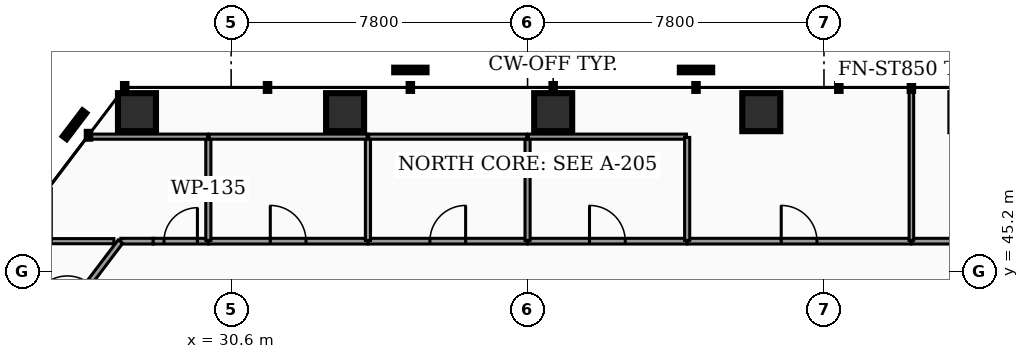
"""IFC4 building model, lengths in metres.
Left out: names, types, materials, properties, quantities, classifications, styles, units other than length and angle.
Written with IfcOpenShell. Run it as: python <this file> out.ifc"""

import sys

from ifc_helpers import new_model, si_unit, direction, frame, frame_2d, origin, origin_2d, place, context, subcontext, project, spatial, rectangle, hollow_rectangle, extrude, element, fill, save


model = new_model("IFC4")
c1 = context("Model", 3, precision=1e-05, world=origin(), true_north=direction((0.0, 1.0)))
c2 = subcontext(c1, "Body", "Model", "MODEL_VIEW")
j1 = project(units=[si_unit("LENGTHUNIT", "METRE"), si_unit("PLANEANGLEUNIT", "RADIAN")], contexts=[c1])
p1 = place(None, origin())
s1 = spatial("IfcSite", under=j1, at=p1, CompositionType="ELEMENT")
p2 = place(p1, origin())
s2 = spatial("IfcBuilding", under=s1, at=p2, CompositionType="ELEMENT")
p3 = place(p2, frame((0.0, 0.0, 47.94)))
s3 = spatial("IfcBuildingStorey", under=s2, at=p3, CompositionType="ELEMENT", Elevation=47.94)
p4 = place(p3, frame((50.026, 49.394, 0.0), z_axis=(0.14189700724, -0.030162599133, 0.989421779096), x_axis=(0.207921314521, 0.978145555103, 0.0)))
e1 = element("IfcColumn", 1, at=p4, inside=s3, PredefinedType="COLUMN", context=c2, shape_type="SweptSolid", body=[
    extrude(hollow_rectangle(XDim=1.0, YDim=1.0, WallThickness=0.05, at=origin_2d()), origin(), (0.0, 0.0, 1.0), 3.861),
])
p5 = place(p3, frame((44.55, 49.394, 0.0), z_axis=(0.068890587168, -0.030398529213, 0.997160978188), x_axis=(0.403702715675, 0.914890221478, 0.0)))
e2 = element("IfcColumn", 2, at=p5, inside=s3, PredefinedType="COLUMN", context=c2, shape_type="SweptSolid", body=[
    extrude(hollow_rectangle(XDim=1.0, YDim=1.0, WallThickness=0.05, at=origin_2d()), origin(), (0.0, 0.0, 1.0), 3.831),
])
p6 = place(p3, frame((39.074, 49.394, 0.0), z_axis=(-0.005238115879, -0.030470503347, 0.999521941014), x_axis=(0.985543500785, -0.169422572462, 0.0)))
e3 = element("IfcColumn", 3, at=p6, inside=s3, PredefinedType="COLUMN", context=c2, shape_type="SweptSolid", body=[
    extrude(hollow_rectangle(XDim=1.0, YDim=1.0, WallThickness=0.05, at=origin_2d()), origin(), (0.0, 0.0, 1.0), 3.822),
])
p7 = place(p3, frame((33.598, 49.394, 0.0), z_axis=(-0.079217404517, -0.030375162343, 0.996394476266), x_axis=(0.358023264849, -0.93371266556, 0.0)))
e4 = element("IfcColumn", 4, at=p7, inside=s3, PredefinedType="COLUMN", context=c2, shape_type="SweptSolid", body=[
    extrude(hollow_rectangle(XDim=1.0, YDim=1.0, WallThickness=0.05, at=origin_2d()), origin(), (0.0, 0.0, 1.0), 3.834),
])
p8 = place(p3, frame((28.122, 49.394, 0.0), z_axis=(-0.151973974665, -0.030116986255, 0.987925542824), x_axis=(0.194391667853, -0.980923992708, 0.0)))
e5 = element("IfcColumn", 5, at=p8, inside=s3, PredefinedType="COLUMN", context=c2, shape_type="SweptSolid", body=[
    extrude(hollow_rectangle(XDim=1.0, YDim=1.0, WallThickness=0.05, at=origin_2d()), origin(), (0.0, 0.0, 1.0), 3.867),
])
p9 = place(p3, frame((27.696, 46.0, 0.0), z_axis=(0.0, 0.0, 1.0), x_axis=(1.0, 0.0, 0.0)))
e6 = element("IfcWall", 6, at=p9, inside=s3, PredefinedType="PARTITIONING", context=c2, shape_type="SweptSolid", body=[
    extrude(rectangle(XDim=0.854, YDim=0.15, at=frame_2d((0.427, 0.0))), origin(), (0.0, 0.0, 1.0), 2.777),
])
p10 = place(p3, frame((28.55, 46.0, 0.0), z_axis=(0.0, 0.0, 1.0), x_axis=(1.0, 0.0, 0.0)))
e7 = element("IfcWall", 7, at=p10, inside=s3, PredefinedType="PARTITIONING", context=c2, shape_type="SweptSolid", body=[
    extrude(rectangle(XDim=1.445, YDim=0.15, at=frame_2d((0.723, 0.0))), origin(), (0.0, 0.0, 1.0), 2.777),
])
p11 = place(p10, frame((0.282, 0.0, 0.0)))
e8 = element("IfcOpeningElement", 8, at=p11, cuts=e7, PredefinedType="OPENING", context=c2, shape_type="SweptSolid", body=[
    extrude(rectangle(XDim=0.88, YDim=2.05, at=frame_2d((0.44, 1.025))), frame((0.0, 0.085, 0.0), z_axis=(0.0, -1.0, 0.0), x_axis=(1.0, 0.0, 0.0)), (0.0, 0.0, 1.0), 0.17),
])
p12 = place(p3, frame((30.005, 46.0, 0.0), z_axis=(0.0, 0.0, 1.0), x_axis=(1.0, 0.0, 0.0)))
e9 = element("IfcWall", 9, at=p12, inside=s3, PredefinedType="PARTITIONING", context=c2, shape_type="SweptSolid", body=[
    extrude(rectangle(XDim=4.19, YDim=0.15, at=frame_2d((2.095, 0.0))), origin(), (0.0, 0.0, 1.0), 2.777),
])
p13 = place(p12, frame((1.625, 0.0, 0.0)))
e10 = element("IfcOpeningElement", 10, at=p13, cuts=e9, PredefinedType="OPENING", context=c2, shape_type="SweptSolid", body=[
    extrude(rectangle(XDim=0.94, YDim=2.05, at=frame_2d((0.47, 1.025))), frame((0.0, 0.085, 0.0), z_axis=(0.0, -1.0, 0.0), x_axis=(1.0, 0.0, 0.0)), (0.0, 0.0, 1.0), 0.17),
])
p14 = place(p3, frame((34.205, 46.0, 0.0), z_axis=(0.0, 0.0, 1.0), x_axis=(1.0, 0.0, 0.0)))
e11 = element("IfcWall", 11, at=p14, inside=s3, PredefinedType="PARTITIONING", context=c2, shape_type="SweptSolid", body=[
    extrude(rectangle(XDim=4.19, YDim=0.15, at=frame_2d((2.095, 0.0))), origin(), (0.0, 0.0, 1.0), 2.777),
])
p15 = place(p14, frame((1.625, 0.0, 0.0)))
e12 = element("IfcOpeningElement", 12, at=p15, cuts=e11, PredefinedType="OPENING", context=c2, shape_type="SweptSolid", body=[
    extrude(rectangle(XDim=0.94, YDim=2.05, at=frame_2d((0.47, 1.025))), frame((0.0, 0.085, 0.0), z_axis=(0.0, -1.0, 0.0), x_axis=(1.0, 0.0, 0.0)), (0.0, 0.0, 1.0), 0.17),
])
p16 = place(p3, frame((38.405, 46.0, 0.0), z_axis=(0.0, 0.0, 1.0), x_axis=(1.0, 0.0, 0.0)))
e13 = element("IfcWall", 13, at=p16, inside=s3, PredefinedType="PARTITIONING", context=c2, shape_type="SweptSolid", body=[
    extrude(rectangle(XDim=4.19, YDim=0.15, at=frame_2d((2.095, 0.0))), origin(), (0.0, 0.0, 1.0), 2.777),
])
p17 = place(p16, frame((1.625, 0.0, 0.0)))
e14 = element("IfcOpeningElement", 14, at=p17, cuts=e13, PredefinedType="OPENING", context=c2, shape_type="SweptSolid", body=[
    extrude(rectangle(XDim=0.94, YDim=2.05, at=frame_2d((0.47, 1.025))), frame((0.0, 0.085, 0.0), z_axis=(0.0, -1.0, 0.0), x_axis=(1.0, 0.0, 0.0)), (0.0, 0.0, 1.0), 0.17),
])
p18 = place(p3, frame((25.462, 43.051, 0.0), z_axis=(0.0, 0.0, 1.0), x_axis=(0.603862791153, 0.7970882821, 0.0)))
e15 = element("IfcWall", 15, at=p18, inside=s3, PredefinedType="PARTITIONING", context=c2, shape_type="SweptSolid", body=[
    extrude(rectangle(XDim=3.684, YDim=0.15, at=frame_2d((1.842, 0.0))), origin(), (0.0, 0.0, 1.0), 2.777),
])
p19 = place(p18, frame((1.372, 0.0, 0.0)))
e16 = element("IfcOpeningElement", 16, at=p19, cuts=e15, PredefinedType="OPENING", context=c2, shape_type="SweptSolid", body=[
    extrude(rectangle(XDim=0.94, YDim=2.05, at=frame_2d((0.47, 1.025))), frame((0.0, 0.085, 0.0), z_axis=(0.0, -1.0, 0.0), x_axis=(1.0, 0.0, 0.0)), (0.0, 0.0, 1.0), 0.17),
])
p20 = place(p3, frame((48.505, 46.0, 0.0), z_axis=(0.0, 0.0, 1.0), x_axis=(1.0, 0.0, 0.0)))
e17 = element("IfcWall", 17, at=p20, inside=s3, PredefinedType="PARTITIONING", context=c2, shape_type="SweptSolid", body=[
    extrude(rectangle(XDim=1.925, YDim=0.15, at=frame_2d((0.962, 0.0))), origin(), (0.0, 0.0, 1.0), 2.777),
])
p21 = place(p3, frame((42.605, 46.0, 0.0), z_axis=(0.0, 0.0, 1.0), x_axis=(1.0, 0.0, 0.0)))
e18 = element("IfcWall", 18, at=p21, inside=s3, PredefinedType="PARTITIONING", context=c2, shape_type="SweptSolid", body=[
    extrude(rectangle(XDim=5.88, YDim=0.15, at=frame_2d((2.94, 0.0))), origin(), (0.0, 0.0, 1.0), 2.777),
])
p22 = place(p21, frame((2.47, 0.0, 0.0)))
e19 = element("IfcOpeningElement", 19, at=p22, cuts=e18, PredefinedType="OPENING", context=c2, shape_type="SweptSolid", body=[
    extrude(rectangle(XDim=0.94, YDim=2.05, at=frame_2d((0.47, 1.025))), frame((0.0, 0.085, 0.0), z_axis=(0.0, -1.0, 0.0), x_axis=(1.0, 0.0, 0.0)), (0.0, 0.0, 1.0), 0.17),
])
p23 = place(p3, frame((30.0, 46.02, 0.0), z_axis=(0.0, 0.0, 1.0), x_axis=(0.0, 1.0, 0.0)))
e20 = element("IfcWall", 20, at=p23, inside=s3, PredefinedType="PARTITIONING", context=c2, shape_type="SweptSolid", body=[
    extrude(rectangle(XDim=2.71, YDim=0.135, at=frame_2d((1.355, 0.0))), origin(), (0.0, 0.0, 1.0), 2.777),
])
p24 = place(p3, frame((25.82, 46.0, 0.0), z_axis=(0.0, 0.0, 1.0), x_axis=(1.0, 0.0, 0.0)))
e21 = element("IfcWall", 21, at=p24, inside=s3, PredefinedType="PARTITIONING", context=c2, shape_type="SweptSolid", body=[
    extrude(rectangle(XDim=1.695, YDim=0.135, at=frame_2d((0.847, 0.0))), origin(), (0.0, 0.0, 1.0), 2.777),
])
p25 = place(p3, frame((26.833, 48.75, 0.0), z_axis=(0.0, 0.0, 1.0), x_axis=(1.0, 0.0, 0.0)))
e22 = element("IfcWall", 22, at=p25, inside=s3, PredefinedType="PARTITIONING", context=c2, shape_type="SweptSolid", body=[
    extrude(rectangle(XDim=3.146, YDim=0.135, at=frame_2d((1.573, 0.0))), origin(), (0.0, 0.0, 1.0), 2.777),
])
p26 = place(p3, frame((34.2, 46.02, 0.0), z_axis=(0.0, 0.0, 1.0), x_axis=(0.0, 1.0, 0.0)))
e23 = element("IfcWall", 23, at=p26, inside=s3, PredefinedType="PARTITIONING", context=c2, shape_type="SweptSolid", body=[
    extrude(rectangle(XDim=2.71, YDim=0.135, at=frame_2d((1.355, 0.0))), origin(), (0.0, 0.0, 1.0), 2.777),
])
p27 = place(p3, frame((30.02, 48.75, 0.0), z_axis=(0.0, 0.0, 1.0), x_axis=(1.0, 0.0, 0.0)))
e24 = element("IfcWall", 24, at=p27, inside=s3, PredefinedType="PARTITIONING", context=c2, shape_type="SweptSolid", body=[
    extrude(rectangle(XDim=4.16, YDim=0.135, at=frame_2d((2.08, 0.0))), origin(), (0.0, 0.0, 1.0), 2.777),
])
p28 = place(p3, frame((38.4, 46.02, 0.0), z_axis=(0.0, 0.0, 1.0), x_axis=(0.0, 1.0, 0.0)))
e25 = element("IfcWall", 25, at=p28, inside=s3, PredefinedType="PARTITIONING", context=c2, shape_type="SweptSolid", body=[
    extrude(rectangle(XDim=2.71, YDim=0.135, at=frame_2d((1.355, 0.0))), origin(), (0.0, 0.0, 1.0), 2.777),
])
p29 = place(p3, frame((34.22, 48.75, 0.0), z_axis=(0.0, 0.0, 1.0), x_axis=(1.0, 0.0, 0.0)))
e26 = element("IfcWall", 26, at=p29, inside=s3, PredefinedType="PARTITIONING", context=c2, shape_type="SweptSolid", body=[
    extrude(rectangle(XDim=4.16, YDim=0.135, at=frame_2d((2.08, 0.0))), origin(), (0.0, 0.0, 1.0), 2.777),
])
p30 = place(p3, frame((38.42, 48.75, 0.0), z_axis=(0.0, 0.0, 1.0), x_axis=(1.0, 0.0, 0.0)))
e27 = element("IfcWall", 27, at=p30, inside=s3, PredefinedType="PARTITIONING", context=c2, shape_type="SweptSolid", body=[
    extrude(rectangle(XDim=4.16, YDim=0.135, at=frame_2d((2.08, 0.0))), origin(), (0.0, 0.0, 1.0), 2.777),
])
p31 = place(p3, frame((42.6, 46.02, 0.0), z_axis=(0.0, 0.0, 1.0), x_axis=(0.0, 1.0, 0.0)))
e28 = element("IfcWall", 28, at=p31, inside=s3, PredefinedType="PARTITIONING", context=c2, shape_type="SweptSolid", body=[
    extrude(rectangle(XDim=2.71, YDim=0.135, at=frame_2d((1.355, 0.0))), origin(), (0.0, 0.0, 1.0), 2.777),
])
p32 = place(p3, frame((48.5, 46.02, 0.0), z_axis=(0.0, 0.0, 1.0), x_axis=(0.0, 1.0, 0.0)))
e29 = element("IfcWall", 29, at=p32, inside=s3, PredefinedType="PARTITIONING", context=c2, shape_type="SweptSolid", body=[
    extrude(rectangle(XDim=4.009, YDim=0.12, at=frame_2d((2.005, 0.0))), origin(), (0.0, 0.0, 1.0), 2.777),
])
p33 = place(p11, origin())
e30 = element("IfcDoor", 30, at=p33, inside=s3, OperationType="SINGLE_SWING_RIGHT", PredefinedType="DOOR", context=c2, shape_type="SweptSolid", body=[
    extrude(rectangle(XDim=0.88, YDim=2.05, at=frame_2d((0.44, 1.025))), frame((0.0, 0.025, 0.0), z_axis=(0.0, -1.0, 0.0), x_axis=(1.0, 0.0, 0.0)), (0.0, 0.0, 1.0), 0.05),
])
fill(e8, e30)
p34 = place(p13, origin())
e31 = element("IfcDoor", 31, at=p34, inside=s3, OperationType="SINGLE_SWING_LEFT", PredefinedType="DOOR", context=c2, shape_type="SweptSolid", body=[
    extrude(rectangle(XDim=0.94, YDim=2.05, at=frame_2d((0.47, 1.025))), frame((0.0, 0.025, 0.0), z_axis=(0.0, -1.0, 0.0), x_axis=(1.0, 0.0, 0.0)), (0.0, 0.0, 1.0), 0.05),
])
fill(e10, e31)
p35 = place(p15, origin())
e32 = element("IfcDoor", 32, at=p35, inside=s3, OperationType="SINGLE_SWING_RIGHT", PredefinedType="DOOR", context=c2, shape_type="SweptSolid", body=[
    extrude(rectangle(XDim=0.94, YDim=2.05, at=frame_2d((0.47, 1.025))), frame((0.0, 0.025, 0.0), z_axis=(0.0, -1.0, 0.0), x_axis=(1.0, 0.0, 0.0)), (0.0, 0.0, 1.0), 0.05),
])
fill(e12, e32)
p36 = place(p17, origin())
e33 = element("IfcDoor", 33, at=p36, inside=s3, OperationType="SINGLE_SWING_LEFT", PredefinedType="DOOR", context=c2, shape_type="SweptSolid", body=[
    extrude(rectangle(XDim=0.94, YDim=2.05, at=frame_2d((0.47, 1.025))), frame((0.0, 0.025, 0.0), z_axis=(0.0, -1.0, 0.0), x_axis=(1.0, 0.0, 0.0)), (0.0, 0.0, 1.0), 0.05),
])
fill(e14, e33)
p37 = place(p22, origin())
e34 = element("IfcDoor", 34, at=p37, inside=s3, OperationType="SINGLE_SWING_LEFT", PredefinedType="DOOR", context=c2, shape_type="SweptSolid", body=[
    extrude(rectangle(XDim=0.94, YDim=2.05, at=frame_2d((0.47, 1.025))), frame((0.0, 0.025, 0.0), z_axis=(0.0, -1.0, 0.0), x_axis=(1.0, 0.0, 0.0)), (0.0, 0.0, 1.0), 0.05),
])
fill(e19, e34)
save(model, sys.argv[1])
